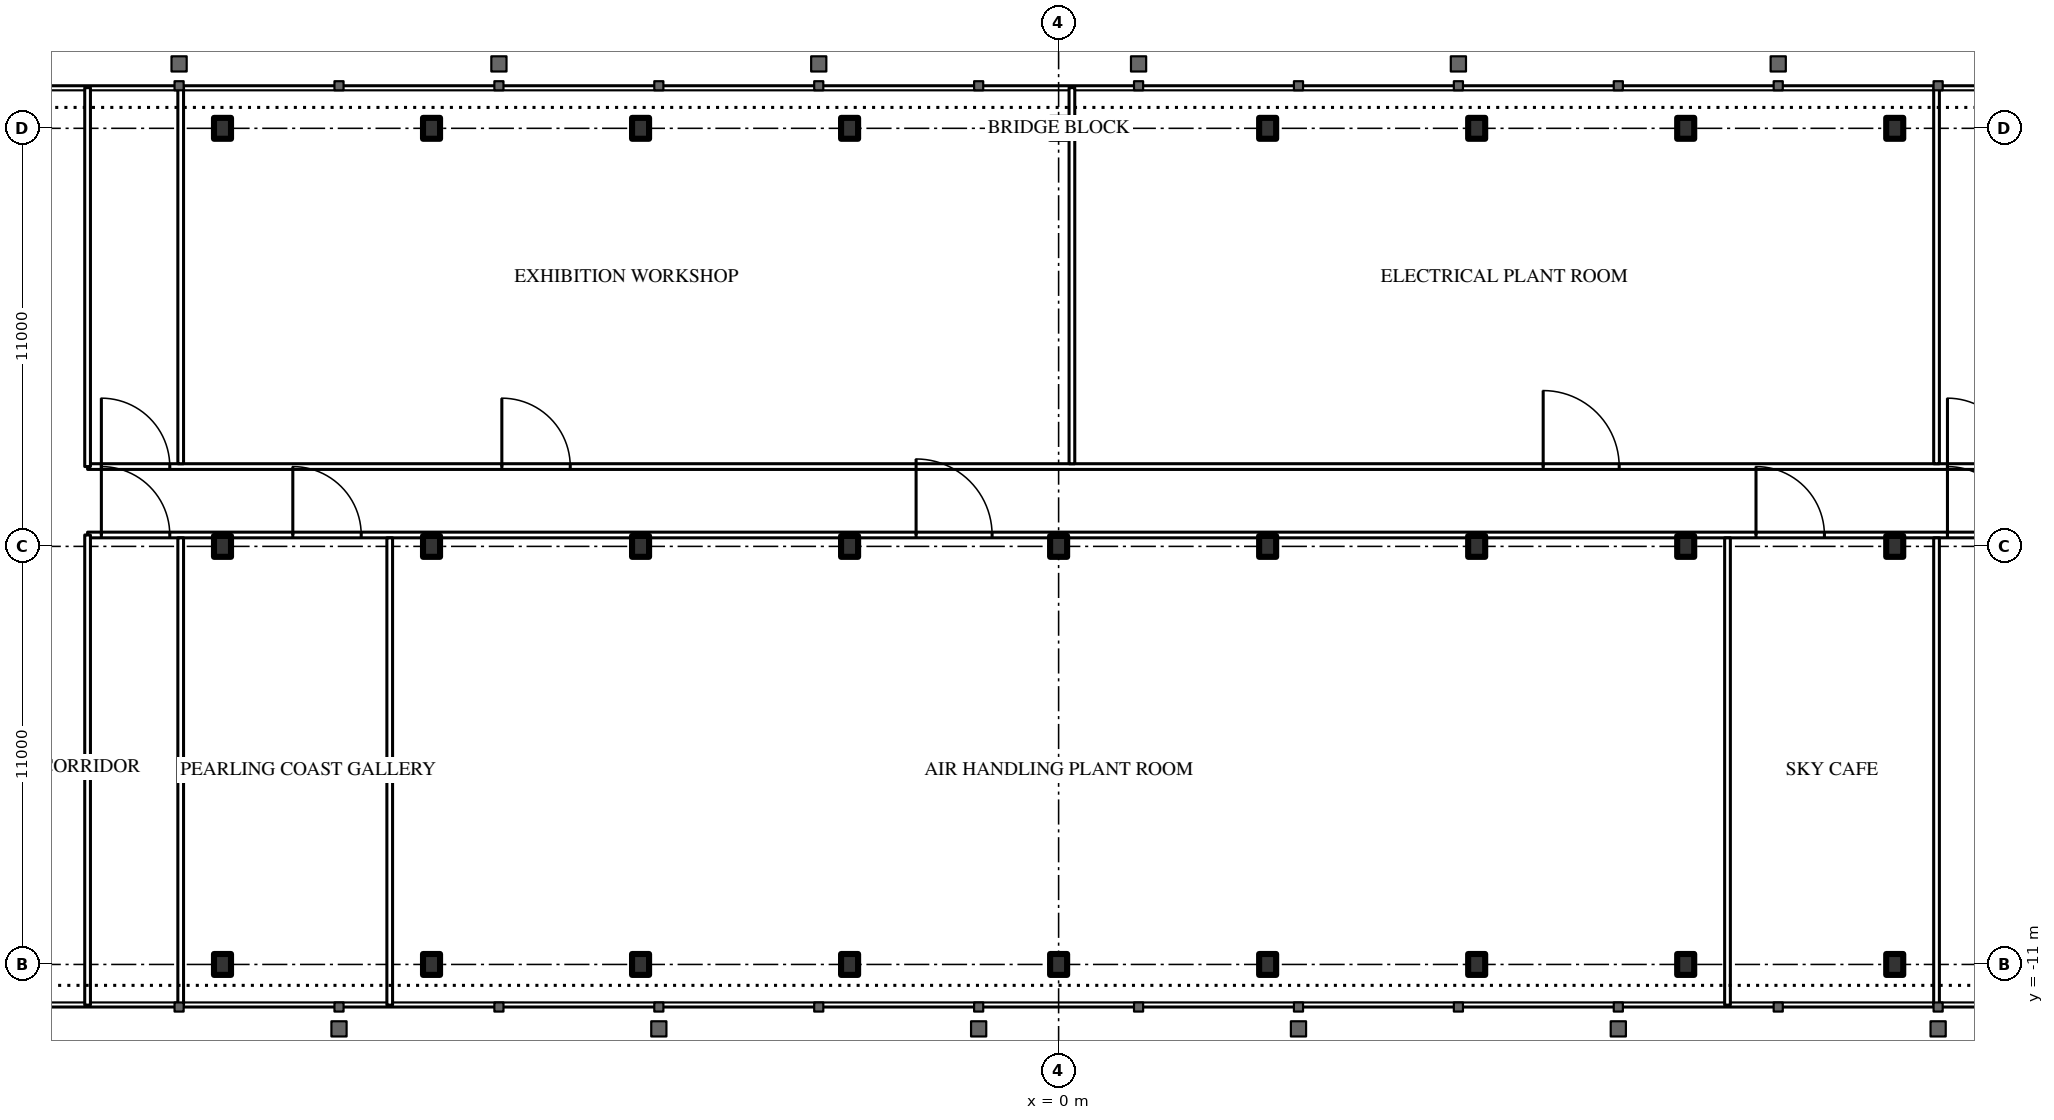
"""IFC4 building model, lengths in metres.
Left out: names, types, materials, properties, quantities, classifications, styles, units other than length and angle.
Written with IfcOpenShell. Run it as: python <this file> out.ifc"""

import sys

from ifc_helpers import new_model, si_unit, direction, frame, frame_2d, origin, origin_2d, place, context, subcontext, project, spatial, rectangle, i_section, extrude, element, fill, save


model = new_model("IFC4")
c1 = context("Model", 3, precision=1e-05, world=origin(), true_north=direction((0.0, 1.0)))
c2 = subcontext(c1, "Body", "Model", "MODEL_VIEW")
j1 = project(units=[si_unit("LENGTHUNIT", "METRE"), si_unit("PLANEANGLEUNIT", "RADIAN")], contexts=[c1])
p1 = place(None, origin())
s1 = spatial("IfcSite", under=j1, at=p1, CompositionType="ELEMENT")
p2 = place(p1, origin())
s2 = spatial("IfcBuilding", under=s1, at=p2, CompositionType="ELEMENT")
p3 = place(p2, frame((0.0, 0.0, 257.3)))
s3 = spatial("IfcBuildingStorey", under=s2, at=p3, CompositionType="ELEMENT", Elevation=257.3)
for number, where, z_axis, x_axis in (
    (1, (-22.0, -11.0, 0.0), (0.0, 0.0, 1.0), (1.0, 0.0, 0.0)),
    (2, (-16.5, -11.0, 0.0), (0.0, 0.0, 1.0), (1.0, 0.0, 0.0)),
    (3, (-11.0, -11.0, 0.0), (0.0, 0.0, 1.0), (1.0, 0.0, 0.0)),
    (4, (-5.5, -11.0, 0.0), (0.0, 0.0, 1.0), (1.0, 0.0, 0.0)),
    (5, (0.0, -11.0, 0.0), (0.0, 0.0, 1.0), (1.0, 0.0, 0.0)),
    (6, (5.5, -11.0, 0.0), (0.0, 0.0, 1.0), (1.0, 0.0, 0.0)),
    (7, (11.0, -11.0, 0.0), (0.0, 0.0, 1.0), (1.0, 0.0, 0.0)),
    (8, (16.5, -11.0, 0.0), (0.0, 0.0, 1.0), (1.0, 0.0, 0.0)),
    (9, (22.0, -11.0, 0.0), (0.0, 0.0, 1.0), (1.0, 0.0, 0.0)),
    (10, (-22.0, 0.0, 0.0), (0.0, 0.0, 1.0), (1.0, 0.0, 0.0)),
    (11, (-16.5, 0.0, 0.0), (0.0, 0.0, 1.0), (1.0, 0.0, 0.0)),
    (12, (-11.0, 0.0, 0.0), (0.0, 0.0, 1.0), (1.0, 0.0, 0.0)),
    (13, (-5.5, 0.0, 0.0), (0.0, 0.0, 1.0), (1.0, 0.0, 0.0)),
    (14, (0.0, 0.0, 0.0), (0.0, 0.0, 1.0), (1.0, 0.0, 0.0)),
    (15, (5.5, 0.0, 0.0), (0.0, 0.0, 1.0), (1.0, 0.0, 0.0)),
    (16, (11.0, 0.0, 0.0), (0.0, 0.0, 1.0), (1.0, 0.0, 0.0)),
    (17, (16.5, 0.0, 0.0), (0.0, 0.0, 1.0), (1.0, 0.0, 0.0)),
    (18, (22.0, 0.0, 0.0), (0.0, 0.0, 1.0), (1.0, 0.0, 0.0)),
    (19, (-22.0, 11.0, 0.0), (0.0, 0.0, 1.0), (1.0, 0.0, 0.0)),
    (20, (-16.5, 11.0, 0.0), (0.0, 0.0, 1.0), (1.0, 0.0, 0.0)),
    (21, (-11.0, 11.0, 0.0), (0.0, 0.0, 1.0), (1.0, 0.0, 0.0)),
    (22, (-5.5, 11.0, 0.0), (0.0, 0.0, 1.0), (1.0, 0.0, 0.0)),
    (23, (0.0, 11.0, 0.0), (0.0, 0.0, 1.0), (1.0, 0.0, 0.0)),
    (24, (5.5, 11.0, 0.0), (0.0, 0.0, 1.0), (1.0, 0.0, 0.0)),
    (25, (11.0, 11.0, 0.0), (0.0, 0.0, 1.0), (1.0, 0.0, 0.0)),
    (26, (16.5, 11.0, 0.0), (0.0, 0.0, 1.0), (1.0, 0.0, 0.0)),
    (27, (22.0, 11.0, 0.0), (0.0, 0.0, 1.0), (1.0, 0.0, 0.0)),
):
    element("IfcColumn", number, at=place(p3, frame(where, z_axis=z_axis, x_axis=x_axis)), inside=s3, PredefinedType="COLUMN", context=c2, shape_type="SweptSolid", body=[
        extrude(i_section(OverallWidth=0.448, OverallDepth=0.55, WebThickness=0.072, FlangeThickness=0.115, FilletRadius=0.02, at=origin_2d()), origin(), (0.0, 0.0, 1.0), 6.0),
    ])
p4 = place(p3, frame((-25.55, 0.3, 0.0), z_axis=(0.0, 0.0, 1.0), x_axis=(1.0, 0.0, 0.0)))
e28 = element("IfcWall", 28, at=p4, inside=s3, PredefinedType="PARTITIONING", context=c2, shape_type="SweptSolid", body=[
    extrude(rectangle(XDim=51.1, YDim=0.15, at=frame_2d((25.55, 0.0))), origin(), (0.0, 0.0, 1.0), 4.8),
])
p5 = place(p4, frame((0.363, 0.0, 0.0)))
e29 = element("IfcOpeningElement", 29, at=p5, cuts=e28, PredefinedType="OPENING", context=c2, shape_type="SweptSolid", body=[
    extrude(rectangle(XDim=1.8, YDim=2.2, at=frame_2d((0.9, 1.1))), frame((0.0, 0.085, 0.0), z_axis=(0.0, -1.0, 0.0), x_axis=(1.0, 0.0, 0.0)), (0.0, 0.0, 1.0), 0.17),
])
p6 = place(p4, frame((5.4, 0.0, 0.0)))
e30 = element("IfcOpeningElement", 30, at=p6, cuts=e28, PredefinedType="OPENING", context=c2, shape_type="SweptSolid", body=[
    extrude(rectangle(XDim=1.8, YDim=2.2, at=frame_2d((0.9, 1.1))), frame((0.0, 0.085, 0.0), z_axis=(0.0, -1.0, 0.0), x_axis=(1.0, 0.0, 0.0)), (0.0, 0.0, 1.0), 0.17),
])
p7 = place(p4, frame((21.8, 0.0, 0.0)))
e31 = element("IfcOpeningElement", 31, at=p7, cuts=e28, PredefinedType="OPENING", context=c2, shape_type="SweptSolid", body=[
    extrude(rectangle(XDim=2.0, YDim=2.4, at=frame_2d((1.0, 1.2))), frame((0.0, 0.085, 0.0), z_axis=(0.0, -1.0, 0.0), x_axis=(1.0, 0.0, 0.0)), (0.0, 0.0, 1.0), 0.17),
])
p8 = place(p4, frame((43.9, 0.0, 0.0)))
e32 = element("IfcOpeningElement", 32, at=p8, cuts=e28, PredefinedType="OPENING", context=c2, shape_type="SweptSolid", body=[
    extrude(rectangle(XDim=1.8, YDim=2.2, at=frame_2d((0.9, 1.1))), frame((0.0, 0.085, 0.0), z_axis=(0.0, -1.0, 0.0), x_axis=(1.0, 0.0, 0.0)), (0.0, 0.0, 1.0), 0.17),
])
p9 = place(p4, frame((48.938, 0.0, 0.0)))
e33 = element("IfcOpeningElement", 33, at=p9, cuts=e28, PredefinedType="OPENING", context=c2, shape_type="SweptSolid", body=[
    extrude(rectangle(XDim=1.8, YDim=2.2, at=frame_2d((0.9, 1.1))), frame((0.0, 0.085, 0.0), z_axis=(0.0, -1.0, 0.0), x_axis=(1.0, 0.0, 0.0)), (0.0, 0.0, 1.0), 0.17),
])
p10 = place(p3, frame((-25.55, 2.1, 0.0), z_axis=(0.0, 0.0, 1.0), x_axis=(1.0, 0.0, 0.0)))
e34 = element("IfcWall", 34, at=p10, inside=s3, PredefinedType="PARTITIONING", context=c2, shape_type="SweptSolid", body=[
    extrude(rectangle(XDim=51.1, YDim=0.15, at=frame_2d((25.55, 0.0))), origin(), (0.0, 0.0, 1.0), 5.8),
])
p11 = place(p10, frame((0.363, 0.0, 0.0)))
e35 = element("IfcOpeningElement", 35, at=p11, cuts=e34, PredefinedType="OPENING", context=c2, shape_type="SweptSolid", body=[
    extrude(rectangle(XDim=1.8, YDim=2.2, at=frame_2d((0.9, 1.1))), frame((0.0, 0.085, 0.0), z_axis=(0.0, -1.0, 0.0), x_axis=(1.0, 0.0, 0.0)), (0.0, 0.0, 1.0), 0.17),
])
p12 = place(p10, frame((10.9, 0.0, 0.0)))
e36 = element("IfcOpeningElement", 36, at=p12, cuts=e34, PredefinedType="OPENING", context=c2, shape_type="SweptSolid", body=[
    extrude(rectangle(XDim=1.8, YDim=2.2, at=frame_2d((0.9, 1.1))), frame((0.0, 0.085, 0.0), z_axis=(0.0, -1.0, 0.0), x_axis=(1.0, 0.0, 0.0)), (0.0, 0.0, 1.0), 0.17),
])
p13 = place(p10, frame((38.3, 0.0, 0.0)))
e37 = element("IfcOpeningElement", 37, at=p13, cuts=e34, PredefinedType="OPENING", context=c2, shape_type="SweptSolid", body=[
    extrude(rectangle(XDim=2.0, YDim=2.4, at=frame_2d((1.0, 1.2))), frame((0.0, 0.085, 0.0), z_axis=(0.0, -1.0, 0.0), x_axis=(1.0, 0.0, 0.0)), (0.0, 0.0, 1.0), 0.17),
])
p14 = place(p10, frame((48.938, 0.0, 0.0)))
e38 = element("IfcOpeningElement", 38, at=p14, cuts=e34, PredefinedType="OPENING", context=c2, shape_type="SweptSolid", body=[
    extrude(rectangle(XDim=1.8, YDim=2.2, at=frame_2d((0.9, 1.1))), frame((0.0, 0.085, 0.0), z_axis=(0.0, -1.0, 0.0), x_axis=(1.0, 0.0, 0.0)), (0.0, 0.0, 1.0), 0.17),
])
p15 = place(p3, frame((-25.55, -12.07, 0.0), z_axis=(0.0, 0.0, 1.0), x_axis=(0.0, 1.0, 0.0)))
e39 = element("IfcWall", 39, at=p15, inside=s3, PredefinedType="PARTITIONING", context=c2, shape_type="SweptSolid", body=[
    extrude(rectangle(XDim=12.37, YDim=0.15, at=frame_2d((6.185, 0.0))), origin(), (0.0, 0.0, 1.0), 5.8),
])
p16 = place(p3, frame((-25.55, 2.1, 0.0), z_axis=(0.0, 0.0, 1.0), x_axis=(0.0, 1.0, 0.0)))
e40 = element("IfcWall", 40, at=p16, inside=s3, PredefinedType="PARTITIONING", context=c2, shape_type="SweptSolid", body=[
    extrude(rectangle(XDim=9.97, YDim=0.15, at=frame_2d((4.985, 0.0))), origin(), (0.0, 0.0, 1.0), 5.8),
])
for number, where, z_axis, x_axis in (
    (41, (-23.1, -12.07, 0.0), (0.0, 0.0, 1.0), (0.0, 1.0, 0.0)),
    (42, (-17.6, -12.07, 0.0), (0.0, 0.0, 1.0), (0.0, 1.0, 0.0)),
    (43, (17.6, -12.07, 0.0), (0.0, 0.0, 1.0), (0.0, 1.0, 0.0)),
    (44, (23.1, -12.07, 0.0), (0.0, 0.0, 1.0), (0.0, 1.0, 0.0)),
):
    element("IfcWall", number, at=place(p3, frame(where, z_axis=z_axis, x_axis=x_axis)), inside=s3, PredefinedType="PARTITIONING", context=c2, shape_type="SweptSolid", body=[
        extrude(rectangle(XDim=12.295, YDim=0.15, at=frame_2d((6.147, 0.0))), origin(), (0.0, 0.0, 1.0), 5.8),
    ])
for number, where, z_axis, x_axis in (
    (45, (-23.1, 2.175, 0.0), (0.0, 0.0, 1.0), (0.0, 1.0, 0.0)),
    (46, (0.35, 2.175, 0.0), (0.0, 0.0, 1.0), (0.0, 1.0, 0.0)),
    (47, (23.1, 2.175, 0.0), (0.0, 0.0, 1.0), (0.0, 1.0, 0.0)),
):
    element("IfcWall", number, at=place(p3, frame(where, z_axis=z_axis, x_axis=x_axis)), inside=s3, PredefinedType="PARTITIONING", context=c2, shape_type="SweptSolid", body=[
        extrude(rectangle(XDim=9.895, YDim=0.15, at=frame_2d((4.948, 0.0))), origin(), (0.0, 0.0, 1.0), 5.8),
    ])
p17 = place(p5, origin())
e48 = element("IfcDoor", 48, at=p17, inside=s3, OperationType="DOUBLE_DOOR_SINGLE_SWING", PredefinedType="DOOR", context=c2, shape_type="SweptSolid", body=[
    extrude(rectangle(XDim=1.8, YDim=2.2, at=frame_2d((0.9, 1.1))), frame((0.0, 0.025, 0.0), z_axis=(0.0, -1.0, 0.0), x_axis=(1.0, 0.0, 0.0)), (0.0, 0.0, 1.0), 0.05),
])
fill(e29, e48)
p18 = place(p6, origin())
e49 = element("IfcDoor", 49, at=p18, inside=s3, OperationType="DOUBLE_DOOR_SINGLE_SWING", PredefinedType="DOOR", context=c2, shape_type="SweptSolid", body=[
    extrude(rectangle(XDim=1.8, YDim=2.2, at=frame_2d((0.9, 1.1))), frame((0.0, 0.025, 0.0), z_axis=(0.0, -1.0, 0.0), x_axis=(1.0, 0.0, 0.0)), (0.0, 0.0, 1.0), 0.05),
])
fill(e30, e49)
p19 = place(p7, origin())
e50 = element("IfcDoor", 50, at=p19, inside=s3, OperationType="DOUBLE_DOOR_SINGLE_SWING", PredefinedType="DOOR", context=c2, shape_type="SweptSolid", body=[
    extrude(rectangle(XDim=2.0, YDim=2.4, at=frame_2d((1.0, 1.2))), frame((0.0, 0.025, 0.0), z_axis=(0.0, -1.0, 0.0), x_axis=(1.0, 0.0, 0.0)), (0.0, 0.0, 1.0), 0.05),
])
fill(e31, e50)
p20 = place(p8, origin())
e51 = element("IfcDoor", 51, at=p20, inside=s3, OperationType="DOUBLE_DOOR_SINGLE_SWING", PredefinedType="DOOR", context=c2, shape_type="SweptSolid", body=[
    extrude(rectangle(XDim=1.8, YDim=2.2, at=frame_2d((0.9, 1.1))), frame((0.0, 0.025, 0.0), z_axis=(0.0, -1.0, 0.0), x_axis=(1.0, 0.0, 0.0)), (0.0, 0.0, 1.0), 0.05),
])
fill(e32, e51)
p21 = place(p9, origin())
e52 = element("IfcDoor", 52, at=p21, inside=s3, OperationType="DOUBLE_DOOR_SINGLE_SWING", PredefinedType="DOOR", context=c2, shape_type="SweptSolid", body=[
    extrude(rectangle(XDim=1.8, YDim=2.2, at=frame_2d((0.9, 1.1))), frame((0.0, 0.025, 0.0), z_axis=(0.0, -1.0, 0.0), x_axis=(1.0, 0.0, 0.0)), (0.0, 0.0, 1.0), 0.05),
])
fill(e33, e52)
p22 = place(p11, origin())
e53 = element("IfcDoor", 53, at=p22, inside=s3, OperationType="DOUBLE_DOOR_SINGLE_SWING", PredefinedType="DOOR", context=c2, shape_type="SweptSolid", body=[
    extrude(rectangle(XDim=1.8, YDim=2.2, at=frame_2d((0.9, 1.1))), frame((0.0, 0.025, 0.0), z_axis=(0.0, -1.0, 0.0), x_axis=(1.0, 0.0, 0.0)), (0.0, 0.0, 1.0), 0.05),
])
fill(e35, e53)
p23 = place(p12, origin())
e54 = element("IfcDoor", 54, at=p23, inside=s3, OperationType="DOUBLE_DOOR_SINGLE_SWING", PredefinedType="DOOR", context=c2, shape_type="SweptSolid", body=[
    extrude(rectangle(XDim=1.8, YDim=2.2, at=frame_2d((0.9, 1.1))), frame((0.0, 0.025, 0.0), z_axis=(0.0, -1.0, 0.0), x_axis=(1.0, 0.0, 0.0)), (0.0, 0.0, 1.0), 0.05),
])
fill(e36, e54)
p24 = place(p13, origin())
e55 = element("IfcDoor", 55, at=p24, inside=s3, OperationType="DOUBLE_DOOR_SINGLE_SWING", PredefinedType="DOOR", context=c2, shape_type="SweptSolid", body=[
    extrude(rectangle(XDim=2.0, YDim=2.4, at=frame_2d((1.0, 1.2))), frame((0.0, 0.025, 0.0), z_axis=(0.0, -1.0, 0.0), x_axis=(1.0, 0.0, 0.0)), (0.0, 0.0, 1.0), 0.05),
])
fill(e37, e55)
p25 = place(p14, origin())
e56 = element("IfcDoor", 56, at=p25, inside=s3, OperationType="DOUBLE_DOOR_SINGLE_SWING", PredefinedType="DOOR", context=c2, shape_type="SweptSolid", body=[
    extrude(rectangle(XDim=1.8, YDim=2.2, at=frame_2d((0.9, 1.1))), frame((0.0, 0.025, 0.0), z_axis=(0.0, -1.0, 0.0), x_axis=(1.0, 0.0, 0.0)), (0.0, 0.0, 1.0), 0.05),
])
fill(e38, e56)
save(model, sys.argv[1])
